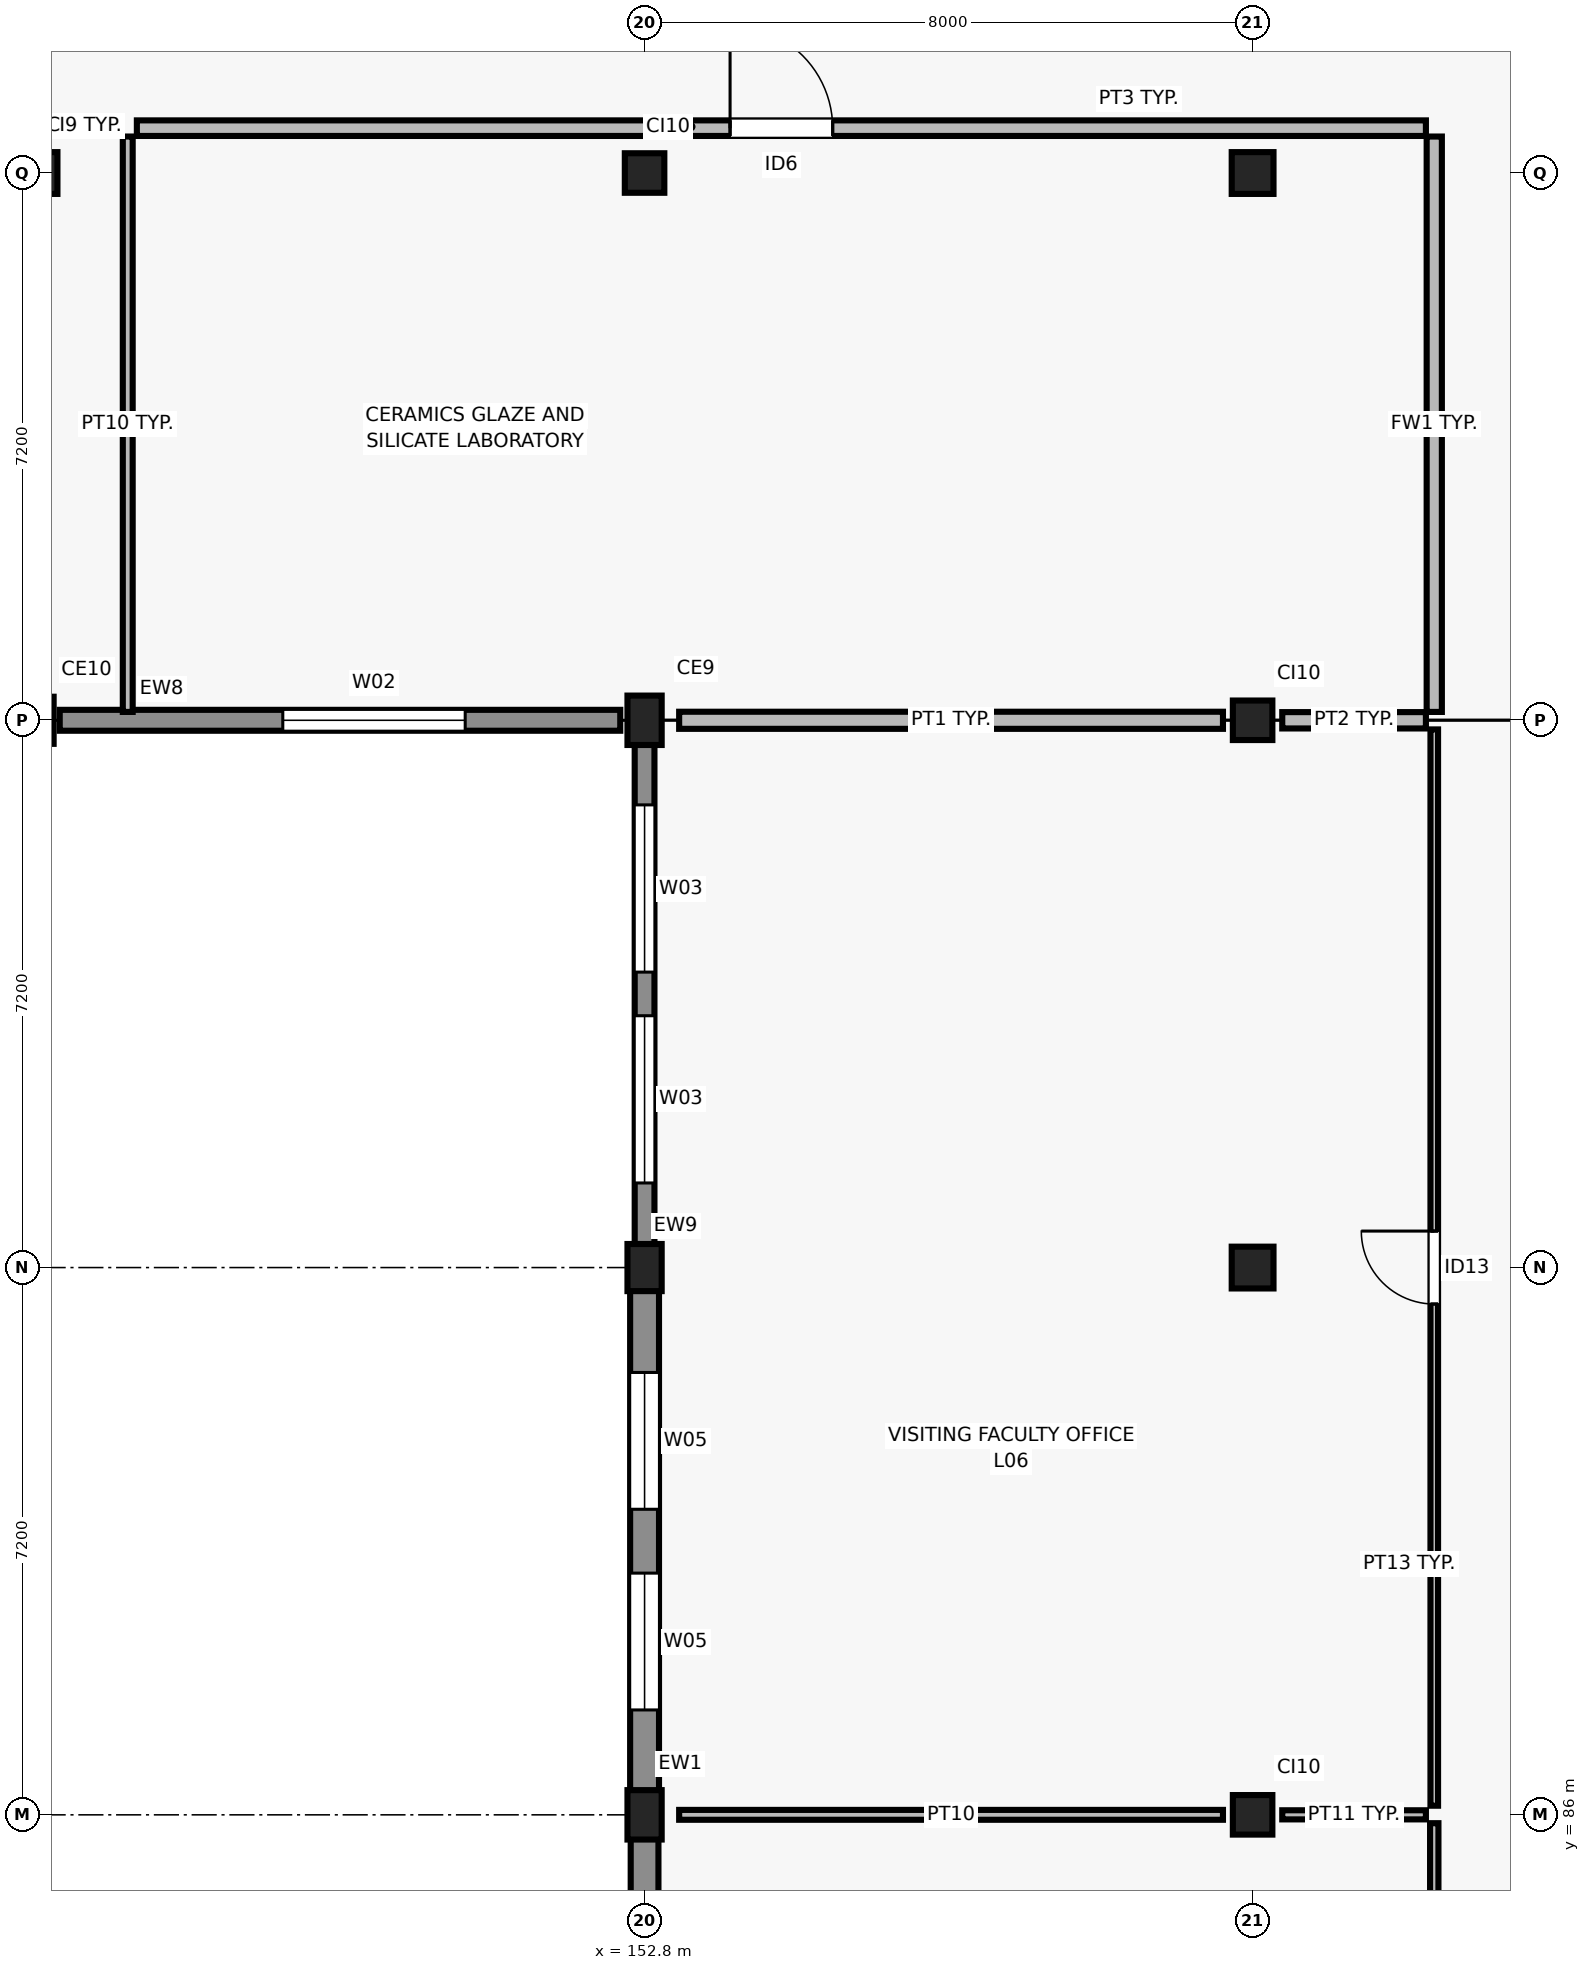
"""IFC4 building model, lengths in metres.
Left out: names, types, materials, properties, quantities, classifications, styles, units other than length and angle.
Written with IfcOpenShell. Run it as: python <this file> out.ifc"""

import sys

from ifc_helpers import new_model, si_unit, direction, frame, frame_2d, origin, origin_2d, place, context, subcontext, project, spatial, rectangle, extrude, element, fill, save


model = new_model("IFC4")
c1 = context("Model", 3, precision=1e-05, world=origin(), true_north=direction((0.0, 1.0)))
c2 = subcontext(c1, "Body", "Model", "MODEL_VIEW")
j1 = project(units=[si_unit("LENGTHUNIT", "METRE"), si_unit("PLANEANGLEUNIT", "RADIAN")], contexts=[c1])
p1 = place(None, origin())
s1 = spatial("IfcSite", under=j1, at=p1, CompositionType="ELEMENT")
p2 = place(p1, origin())
s2 = spatial("IfcBuilding", under=s1, at=p2, CompositionType="ELEMENT")
p3 = place(p2, frame((0.0, 0.0, 25.8)))
s3 = spatial("IfcBuildingStorey", under=s2, at=p3, CompositionType="ELEMENT", Elevation=25.8)
p4 = place(p3, frame((144.8, 100.4, 0.0), z_axis=(0.0, 0.0, 1.0), x_axis=(1.0, 0.0, 0.0)))
e1 = element("IfcColumn", 1, at=p4, inside=s3, PredefinedType="COLUMN", context=c2, shape_type="SweptSolid", body=[
    extrude(rectangle(XDim=0.62, YDim=0.45, at=origin_2d()), origin(), (0.0, 0.0, 1.0), 4.2),
])
p5 = place(p3, frame((144.8, 107.6, 0.0), z_axis=(0.0, 0.0, 1.0), x_axis=(1.0, 0.0, 0.0)))
e2 = element("IfcColumn", 2, at=p5, inside=s3, PredefinedType="COLUMN", context=c2, shape_type="SweptSolid", body=[
    extrude(rectangle(XDim=0.55, YDim=0.55, at=origin_2d()), origin(), (0.0, 0.0, 1.0), 4.2),
])
p6 = place(p3, frame((152.8, 86.0, 0.0), z_axis=(0.0, 0.0, 1.0), x_axis=(1.0, 0.0, 0.0)))
e3 = element("IfcColumn", 3, at=p6, inside=s3, PredefinedType="COLUMN", context=c2, shape_type="SweptSolid", body=[
    extrude(rectangle(XDim=0.65, YDim=0.45, at=origin_2d()), origin(), (0.0, 0.0, 1.0), 4.2),
])
p7 = place(p3, frame((152.8, 93.2, 0.0), z_axis=(0.0, 0.0, 1.0), x_axis=(1.0, 0.0, 0.0)))
e4 = element("IfcColumn", 4, at=p7, inside=s3, PredefinedType="COLUMN", context=c2, shape_type="SweptSolid", body=[
    extrude(rectangle(XDim=0.62, YDim=0.45, at=origin_2d()), origin(), (0.0, 0.0, 1.0), 4.2),
])
p8 = place(p3, frame((152.8, 100.4, 0.0), z_axis=(0.0, 0.0, 1.0), x_axis=(1.0, 0.0, 0.0)))
e5 = element("IfcColumn", 5, at=p8, inside=s3, PredefinedType="COLUMN", context=c2, shape_type="SweptSolid", body=[
    extrude(rectangle(XDim=0.65, YDim=0.45, at=origin_2d()), origin(), (0.0, 0.0, 1.0), 4.2),
])
for number, where, z_axis, x_axis in (
    (6, (152.8, 107.6, 0.0), (0.0, 0.0, 1.0), (1.0, 0.0, 0.0)),
    (7, (160.8, 86.0, 0.0), (0.0, 0.0, 1.0), (1.0, 0.0, 0.0)),
):
    element("IfcColumn", number, at=place(p3, frame(where, z_axis=z_axis, x_axis=x_axis)), inside=s3, PredefinedType="COLUMN", context=c2, shape_type="SweptSolid", body=[
        extrude(rectangle(XDim=0.52, YDim=0.52, at=origin_2d()), origin(), (0.0, 0.0, 1.0), 4.2),
    ])
p9 = place(p3, frame((160.8, 93.2, 0.0), z_axis=(0.0, 0.0, 1.0), x_axis=(1.0, 0.0, 0.0)))
e8 = element("IfcColumn", 8, at=p9, inside=s3, PredefinedType="COLUMN", context=c2, shape_type="SweptSolid", body=[
    extrude(rectangle(XDim=0.55, YDim=0.55, at=origin_2d()), origin(), (0.0, 0.0, 1.0), 4.2),
])
p10 = place(p3, frame((160.8, 100.4, 0.0), z_axis=(0.0, 0.0, 1.0), x_axis=(1.0, 0.0, 0.0)))
e9 = element("IfcColumn", 9, at=p10, inside=s3, PredefinedType="COLUMN", context=c2, shape_type="SweptSolid", body=[
    extrude(rectangle(XDim=0.52, YDim=0.52, at=origin_2d()), origin(), (0.0, 0.0, 1.0), 4.2),
])
p11 = place(p3, frame((160.8, 107.6, 0.0), z_axis=(0.0, 0.0, 1.0), x_axis=(1.0, 0.0, 0.0)))
e10 = element("IfcColumn", 10, at=p11, inside=s3, PredefinedType="COLUMN", context=c2, shape_type="SweptSolid", body=[
    extrude(rectangle(XDim=0.55, YDim=0.55, at=origin_2d()), origin(), (0.0, 0.0, 1.0), 4.2),
])
p12 = place(p3, frame((145.105, 100.4, 0.0), z_axis=(0.0, 0.0, 1.0), x_axis=(1.0, 0.0, 0.0)))
e11 = element("IfcWall", 11, at=p12, inside=s3, PredefinedType="SOLIDWALL", context=c2, shape_type="SweptSolid", body=[
    extrude(rectangle(XDim=7.375, YDim=0.275, at=frame_2d((3.688, 0.0))), origin(), (0.0, 0.0, 1.0), 3.295),
])
p13 = place(p12, frame((2.935, 0.0, 0.9)))
e12 = element("IfcOpeningElement", 12, at=p13, cuts=e11, PredefinedType="OPENING", context=c2, shape_type="SweptSolid", body=[
    extrude(rectangle(XDim=2.4, YDim=1.8, at=frame_2d((1.2, 0.9))), frame((0.0, 0.147, 0.0), z_axis=(0.0, -1.0, 0.0), x_axis=(1.0, 0.0, 0.0)), (0.0, 0.0, 1.0), 0.295),
])
p14 = place(p3, frame((152.8, 100.18, 0.0), z_axis=(0.0, 0.0, 1.0), x_axis=(0.0, -1.0, 0.0)))
e13 = element("IfcWall", 13, at=p14, inside=s3, PredefinedType="SOLIDWALL", context=c2, shape_type="SweptSolid", body=[
    extrude(rectangle(XDim=6.76, YDim=0.26, at=frame_2d((3.38, 0.0))), origin(), (0.0, 0.0, 1.0), 3.455),
])
p15 = place(p14, frame((0.893, 0.0, 0.9)))
e14 = element("IfcOpeningElement", 14, at=p15, cuts=e13, PredefinedType="OPENING", context=c2, shape_type="SweptSolid", body=[
    extrude(rectangle(XDim=2.2, YDim=1.8, at=frame_2d((1.1, 0.9))), frame((0.0, 0.14, 0.0), z_axis=(0.0, -1.0, 0.0), x_axis=(1.0, 0.0, 0.0)), (0.0, 0.0, 1.0), 0.28),
])
p16 = place(p14, frame((3.667, 0.0, 0.9)))
e15 = element("IfcOpeningElement", 15, at=p16, cuts=e13, PredefinedType="OPENING", context=c2, shape_type="SweptSolid", body=[
    extrude(rectangle(XDim=2.2, YDim=1.8, at=frame_2d((1.1, 0.9))), frame((0.0, 0.14, 0.0), z_axis=(0.0, -1.0, 0.0), x_axis=(1.0, 0.0, 0.0)), (0.0, 0.0, 1.0), 0.28),
])
p17 = place(p3, frame((152.8, 92.98, 0.0), z_axis=(0.0, 0.0, 1.0), x_axis=(0.0, -1.0, 0.0)))
e16 = element("IfcWall", 16, at=p17, inside=s3, PredefinedType="SOLIDWALL", context=c2, shape_type="SweptSolid", body=[
    extrude(rectangle(XDim=6.76, YDim=0.38, at=frame_2d((3.38, 0.0))), origin(), (0.0, 0.0, 1.0), 3.395),
])
p18 = place(p17, frame((1.16, 0.0, 0.9)))
e17 = element("IfcOpeningElement", 17, at=p18, cuts=e16, PredefinedType="OPENING", context=c2, shape_type="SweptSolid", body=[
    extrude(rectangle(XDim=1.8, YDim=1.8, at=frame_2d((0.9, 0.9))), frame((0.0, 0.2, 0.0), z_axis=(0.0, -1.0, 0.0), x_axis=(1.0, 0.0, 0.0)), (0.0, 0.0, 1.0), 0.4),
])
p19 = place(p17, frame((3.8, 0.0, 0.9)))
e18 = element("IfcOpeningElement", 18, at=p19, cuts=e16, PredefinedType="OPENING", context=c2, shape_type="SweptSolid", body=[
    extrude(rectangle(XDim=1.8, YDim=1.8, at=frame_2d((0.9, 0.9))), frame((0.0, 0.2, 0.0), z_axis=(0.0, -1.0, 0.0), x_axis=(1.0, 0.0, 0.0)), (0.0, 0.0, 1.0), 0.4),
])
p20 = place(p3, frame((152.8, 85.78, 0.0), z_axis=(0.0, 0.0, 1.0), x_axis=(0.0, -1.0, 0.0)))
e19 = element("IfcWall", 19, at=p20, inside=s3, PredefinedType="SOLIDWALL", context=c2, shape_type="SweptSolid", body=[
    extrude(rectangle(XDim=6.76, YDim=0.365, at=frame_2d((3.38, 0.0))), origin(), (0.0, 0.0, 1.0), 3.355),
])
p21 = place(p20, frame((1.427, 0.0, 0.9)))
e20 = element("IfcOpeningElement", 20, at=p21, cuts=e19, PredefinedType="OPENING", context=c2, shape_type="SweptSolid", body=[
    extrude(rectangle(XDim=1.4, YDim=1.8, at=frame_2d((0.7, 0.9))), frame((0.0, 0.192, 0.0), z_axis=(0.0, -1.0, 0.0), x_axis=(1.0, 0.0, 0.0)), (0.0, 0.0, 1.0), 0.385),
])
p22 = place(p20, frame((3.933, 0.0, 0.9)))
e21 = element("IfcOpeningElement", 21, at=p22, cuts=e19, PredefinedType="OPENING", context=c2, shape_type="SweptSolid", body=[
    extrude(rectangle(XDim=1.4, YDim=1.8, at=frame_2d((0.7, 0.9))), frame((0.0, 0.192, 0.0), z_axis=(0.0, -1.0, 0.0), x_axis=(1.0, 0.0, 0.0)), (0.0, 0.0, 1.0), 0.385),
])
p23 = place(p3, frame((124.12, 108.19, 0.0), z_axis=(0.0, 0.0, 1.0), x_axis=(1.0, 0.0, 0.0)))
e22 = element("IfcWall", 22, at=p23, inside=s3, PredefinedType="PARTITIONING", context=c2, shape_type="SweptSolid", body=[
    extrude(rectangle(XDim=21.77, YDim=0.14, at=frame_2d((10.885, 0.0))), origin(), (0.0, 0.0, 1.0), 3.9),
])
p24 = place(p23, frame((10.325, 0.0, 0.0)))
e23 = element("IfcOpeningElement", 23, at=p24, cuts=e22, PredefinedType="OPENING", context=c2, shape_type="SweptSolid", body=[
    extrude(rectangle(XDim=1.12, YDim=2.2, at=frame_2d((0.56, 1.1))), frame((0.0, 0.08, 0.0), z_axis=(0.0, -1.0, 0.0), x_axis=(1.0, 0.0, 0.0)), (0.0, 0.0, 1.0), 0.16),
])
p25 = place(p3, frame((146.0, 100.51, 0.0), z_axis=(0.0, 0.0, 1.0), x_axis=(0.0, 1.0, 0.0)))
e24 = element("IfcWall", 24, at=p25, inside=s3, PredefinedType="PARTITIONING", context=c2, shape_type="SweptSolid", body=[
    extrude(rectangle(XDim=7.57, YDim=0.13, at=frame_2d((3.785, 0.0))), origin(), (0.0, 0.0, 1.0), 3.9),
])
p26 = place(p3, frame((153.255, 100.4, 0.0), z_axis=(0.0, 0.0, 1.0), x_axis=(1.0, 0.0, 0.0)))
e25 = element("IfcWall", 25, at=p26, inside=s3, PredefinedType="PARTITIONING", context=c2, shape_type="SweptSolid", body=[
    extrude(rectangle(XDim=7.155, YDim=0.225, at=frame_2d((3.578, 0.0))), origin(), (0.0, 0.0, 1.0), 3.425),
])
p27 = place(p3, frame((161.19, 100.4, 0.0), z_axis=(0.0, 0.0, 1.0), x_axis=(1.0, 0.0, 0.0)))
e26 = element("IfcWall", 26, at=p27, inside=s3, PredefinedType="PARTITIONING", context=c2, shape_type="SweptSolid", body=[
    extrude(rectangle(XDim=1.89, YDim=0.215, at=frame_2d((0.945, 0.0))), origin(), (0.0, 0.0, 1.0), 3.475),
])
p28 = place(p3, frame((146.12, 108.19, 0.0), z_axis=(0.0, 0.0, 1.0), x_axis=(1.0, 0.0, 0.0)))
e27 = element("IfcWall", 27, at=p28, inside=s3, PredefinedType="PARTITIONING", context=c2, shape_type="SweptSolid", body=[
    extrude(rectangle(XDim=16.96, YDim=0.205, at=frame_2d((8.48, 0.0))), origin(), (0.0, 0.0, 1.0), 3.9),
])
p29 = place(p28, frame((7.805, 0.0, 0.0)))
e28 = element("IfcOpeningElement", 28, at=p29, cuts=e27, PredefinedType="OPENING", context=c2, shape_type="SweptSolid", body=[
    extrude(rectangle(XDim=1.35, YDim=2.2, at=frame_2d((0.675, 1.1))), frame((0.0, 0.113, 0.0), z_axis=(0.0, -1.0, 0.0), x_axis=(1.0, 0.0, 0.0)), (0.0, 0.0, 1.0), 0.225),
])
p30 = place(p3, frame((163.19, 100.51, 0.0), z_axis=(0.0, 0.0, 1.0), x_axis=(0.0, 1.0, 0.0)))
e29 = element("IfcWall", 29, at=p30, inside=s3, PredefinedType="SOLIDWALL", context=c2, shape_type="SweptSolid", body=[
    extrude(rectangle(XDim=7.57, YDim=0.2, at=frame_2d((3.785, 0.0))), origin(), (0.0, 0.0, 1.0), 3.9),
])
p31 = place(p3, frame((153.255, 86.0, 0.0), z_axis=(0.0, 0.0, 1.0), x_axis=(1.0, 0.0, 0.0)))
e30 = element("IfcWall", 30, at=p31, inside=s3, PredefinedType="PARTITIONING", context=c2, shape_type="SweptSolid", body=[
    extrude(rectangle(XDim=7.155, YDim=0.13, at=frame_2d((3.578, 0.0))), origin(), (0.0, 0.0, 1.0), 3.315),
])
p32 = place(p3, frame((161.19, 86.0, 0.0), z_axis=(0.0, 0.0, 1.0), x_axis=(1.0, 0.0, 0.0)))
e31 = element("IfcWall", 31, at=p32, inside=s3, PredefinedType="PARTITIONING", context=c2, shape_type="SweptSolid", body=[
    extrude(rectangle(XDim=1.89, YDim=0.12, at=frame_2d((0.945, 0.0))), origin(), (0.0, 0.0, 1.0), 3.325),
])
p33 = place(p3, frame((163.19, 70.91, 0.0), z_axis=(0.0, 0.0, 1.0), x_axis=(0.0, 1.0, 0.0)))
e32 = element("IfcWall", 32, at=p33, inside=s3, PredefinedType="PARTITIONING", context=c2, shape_type="SweptSolid", body=[
    extrude(rectangle(XDim=14.98, YDim=0.11, at=frame_2d((7.49, 0.0))), origin(), (0.0, 0.0, 1.0), 3.9),
])
p34 = place(p33, frame((6.99, 0.0, 0.0)))
e33 = element("IfcOpeningElement", 33, at=p34, cuts=e32, PredefinedType="OPENING", context=c2, shape_type="SweptSolid", body=[
    extrude(rectangle(XDim=1.0, YDim=2.15, at=frame_2d((0.5, 1.075))), frame((0.0, 0.065, 0.0), z_axis=(0.0, -1.0, 0.0), x_axis=(1.0, 0.0, 0.0)), (0.0, 0.0, 1.0), 0.13),
])
p35 = place(p3, frame((163.19, 86.12, 0.0), z_axis=(0.0, 0.0, 1.0), x_axis=(0.0, 1.0, 0.0)))
e34 = element("IfcWall", 34, at=p35, inside=s3, PredefinedType="PARTITIONING", context=c2, shape_type="SweptSolid", body=[
    extrude(rectangle(XDim=14.16, YDim=0.1, at=frame_2d((7.08, 0.0))), origin(), (0.0, 0.0, 1.0), 3.9),
])
p36 = place(p35, frame((6.6, 0.0, 0.0)))
e35 = element("IfcOpeningElement", 35, at=p36, cuts=e34, PredefinedType="OPENING", context=c2, shape_type="SweptSolid", body=[
    extrude(rectangle(XDim=0.96, YDim=2.15, at=frame_2d((0.48, 1.075))), frame((0.0, 0.06, 0.0), z_axis=(0.0, -1.0, 0.0), x_axis=(1.0, 0.0, 0.0)), (0.0, 0.0, 1.0), 0.12),
])
p37 = place(p13, origin())
e36 = element("IfcWindow", 36, at=p37, inside=s3, PartitioningType="SINGLE_PANEL", PredefinedType="WINDOW", context=c2, shape_type="SweptSolid", body=[
    extrude(rectangle(XDim=2.4, YDim=1.8, at=frame_2d((1.2, 0.9))), frame((0.0, 0.03, 0.0), z_axis=(0.0, -1.0, 0.0), x_axis=(1.0, 0.0, 0.0)), (0.0, 0.0, 1.0), 0.06),
])
fill(e12, e36)
p38 = place(p15, origin())
e37 = element("IfcWindow", 37, at=p38, inside=s3, PartitioningType="SINGLE_PANEL", PredefinedType="WINDOW", context=c2, shape_type="SweptSolid", body=[
    extrude(rectangle(XDim=2.2, YDim=1.8, at=frame_2d((1.1, 0.9))), frame((0.0, 0.03, 0.0), z_axis=(0.0, -1.0, 0.0), x_axis=(1.0, 0.0, 0.0)), (0.0, 0.0, 1.0), 0.06),
])
fill(e14, e37)
p39 = place(p16, origin())
e38 = element("IfcWindow", 38, at=p39, inside=s3, PartitioningType="SINGLE_PANEL", PredefinedType="WINDOW", context=c2, shape_type="SweptSolid", body=[
    extrude(rectangle(XDim=2.2, YDim=1.8, at=frame_2d((1.1, 0.9))), frame((0.0, 0.03, 0.0), z_axis=(0.0, -1.0, 0.0), x_axis=(1.0, 0.0, 0.0)), (0.0, 0.0, 1.0), 0.06),
])
fill(e15, e38)
p40 = place(p18, origin())
e39 = element("IfcWindow", 39, at=p40, inside=s3, PartitioningType="SINGLE_PANEL", PredefinedType="WINDOW", context=c2, shape_type="SweptSolid", body=[
    extrude(rectangle(XDim=1.8, YDim=1.8, at=frame_2d((0.9, 0.9))), frame((0.0, 0.03, 0.0), z_axis=(0.0, -1.0, 0.0), x_axis=(1.0, 0.0, 0.0)), (0.0, 0.0, 1.0), 0.06),
])
fill(e17, e39)
p41 = place(p19, origin())
e40 = element("IfcWindow", 40, at=p41, inside=s3, PartitioningType="SINGLE_PANEL", PredefinedType="WINDOW", context=c2, shape_type="SweptSolid", body=[
    extrude(rectangle(XDim=1.8, YDim=1.8, at=frame_2d((0.9, 0.9))), frame((0.0, 0.03, 0.0), z_axis=(0.0, -1.0, 0.0), x_axis=(1.0, 0.0, 0.0)), (0.0, 0.0, 1.0), 0.06),
])
fill(e18, e40)
p42 = place(p29, origin())
e41 = element("IfcDoor", 41, at=p42, inside=s3, OperationType="SINGLE_SWING_LEFT", PredefinedType="DOOR", context=c2, shape_type="SweptSolid", body=[
    extrude(rectangle(XDim=1.35, YDim=2.2, at=frame_2d((0.675, 1.1))), frame((0.0, 0.025, 0.0), z_axis=(0.0, -1.0, 0.0), x_axis=(1.0, 0.0, 0.0)), (0.0, 0.0, 1.0), 0.05),
])
fill(e28, e41)
p43 = place(p36, origin())
e42 = element("IfcDoor", 42, at=p43, inside=s3, OperationType="SINGLE_SWING_RIGHT", PredefinedType="DOOR", context=c2, shape_type="SweptSolid", body=[
    extrude(rectangle(XDim=0.96, YDim=2.15, at=frame_2d((0.48, 1.075))), frame((0.0, 0.025, 0.0), z_axis=(0.0, -1.0, 0.0), x_axis=(1.0, 0.0, 0.0)), (0.0, 0.0, 1.0), 0.05),
])
fill(e35, e42)
save(model, sys.argv[1])
